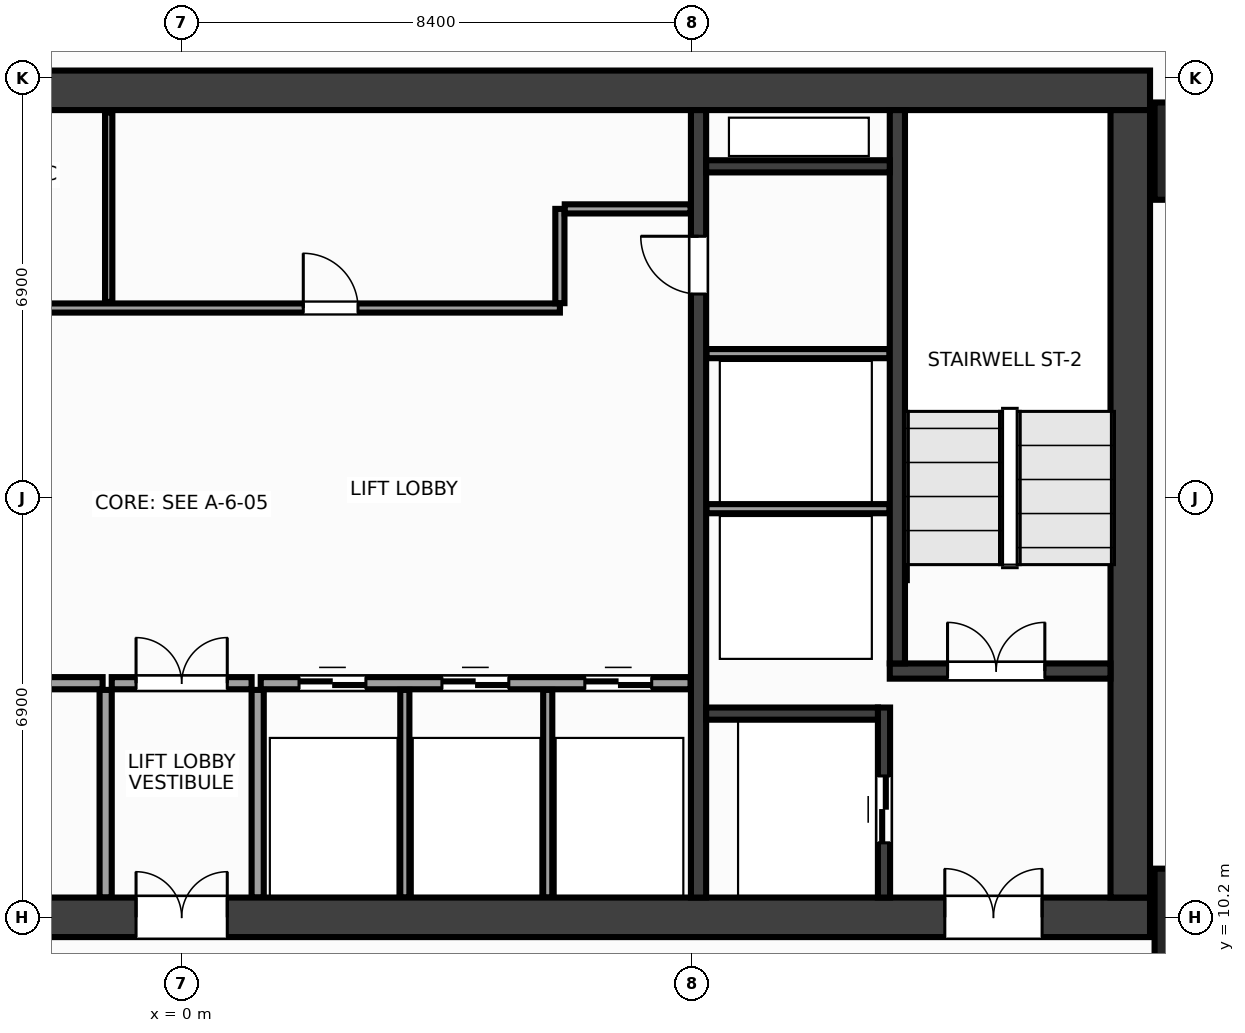
"""IFC4 building model, lengths in metres.
Left out: names, types, materials, properties, quantities, classifications, styles, units other than length and angle.
Written with IfcOpenShell. Run it as: python <this file> out.ifc"""

import sys

from ifc_helpers import new_model, si_unit, direction, frame, frame_2d, origin, origin_2d, place, context, subcontext, project, spatial, rectangle, extrude, source, transform, mapped, element, fill, save


model = new_model("IFC4")
c1 = context("Model", 3, precision=1e-05, world=origin(), true_north=direction((0.0, 1.0)))
c2 = subcontext(c1, "Body", "Model", "MODEL_VIEW")
j1 = project(units=[si_unit("LENGTHUNIT", "METRE"), si_unit("PLANEANGLEUNIT", "RADIAN")], contexts=[c1])
p1 = place(None, origin())
s1 = spatial("IfcSite", under=j1, at=p1, CompositionType="ELEMENT")
p2 = place(p1, origin())
s2 = spatial("IfcBuilding", under=s1, at=p2, CompositionType="ELEMENT")
p3 = place(p2, frame((0.0, 0.0, 146.0)))
s3 = spatial("IfcBuildingStorey", under=s2, at=p3, CompositionType="ELEMENT", Elevation=146.0)
m1 = source(origin(), c2, "Body", "SweptSolid", [
    extrude(rectangle(XDim=31.85, YDim=0.65, at=frame_2d((15.925, 0.0))), origin(), (0.0, 0.0, 1.0), 3.6),
])
p4 = place(p3, frame((-15.925, 23.8, 0.0), z_axis=(0.0, 0.0, 1.0), x_axis=(1.0, 0.0, 0.0)))
e1 = element("IfcWall", 1, at=p4, inside=s3, PredefinedType="SHEAR", context=c2, shape_type="MappedRepresentation", body=[
    mapped(m1, transform((0.0, 0.0, 0.0), x_axis=(1.0, 0.0, 0.0), y_axis=(0.0, 1.0, 0.0), z_axis=(0.0, 0.0, 1.0), scale=1.0)),
])
p5 = place(p3, frame((-15.925, 10.2, 0.0), z_axis=(0.0, 0.0, 1.0), x_axis=(1.0, 0.0, 0.0)))
e2 = element("IfcWall", 2, at=p5, inside=s3, PredefinedType="SHEAR", context=c2, shape_type="MappedRepresentation", body=[
    mapped(m1, transform((0.0, 0.0, 0.0), x_axis=(1.0, 0.0, 0.0), y_axis=(0.0, 1.0, 0.0), z_axis=(0.0, 0.0, 1.0), scale=1.0)),
])
p6 = place(p5, frame((1.775, 0.0, 0.0)))
e3 = element("IfcOpeningElement", 3, at=p6, cuts=e2, PredefinedType="OPENING", context=c2, shape_type="SweptSolid", body=[
    extrude(rectangle(XDim=1.6, YDim=2.15, at=frame_2d((0.8, 1.075))), frame((0.0, 0.337, 0.0), z_axis=(0.0, -1.0, 0.0), x_axis=(1.0, 0.0, 0.0)), (0.0, 0.0, 1.0), 0.674),
])
p7 = place(p5, frame((28.475, 0.0, 0.0)))
e4 = element("IfcOpeningElement", 4, at=p7, cuts=e2, PredefinedType="OPENING", context=c2, shape_type="SweptSolid", body=[
    extrude(rectangle(XDim=1.6, YDim=2.15, at=frame_2d((0.8, 1.075))), frame((0.0, 0.337, 0.0), z_axis=(0.0, -1.0, 0.0), x_axis=(1.0, 0.0, 0.0)), (0.0, 0.0, 1.0), 0.674),
])
p8 = place(p5, frame((15.175, 0.0, 0.0)))
e5 = element("IfcOpeningElement", 5, at=p8, cuts=e2, PredefinedType="OPENING", context=c2, shape_type="SweptSolid", body=[
    extrude(rectangle(XDim=1.5, YDim=2.2, at=frame_2d((0.75, 1.1))), frame((0.0, 0.337, 0.0), z_axis=(0.0, -1.0, 0.0), x_axis=(1.0, 0.0, 0.0)), (0.0, 0.0, 1.0), 0.674),
])
m2 = source(origin(), c2, "Body", "SweptSolid", [
    extrude(rectangle(XDim=12.95, YDim=0.65, at=frame_2d((6.475, 0.0))), origin(), (0.0, 0.0, 1.0), 3.6),
])
p9 = place(p3, frame((15.6, 10.525, 0.0), z_axis=(0.0, 0.0, 1.0), x_axis=(0.0, 1.0, 0.0)))
e6 = element("IfcWall", 6, at=p9, inside=s3, PredefinedType="SHEAR", context=c2, shape_type="MappedRepresentation", body=[
    mapped(m2, transform((0.0, 0.0, 0.0), x_axis=(1.0, 0.0, 0.0), y_axis=(0.0, 1.0, 0.0), z_axis=(0.0, 0.0, 1.0), scale=1.0)),
])
m3 = source(origin(), c2, "Body", "SweptSolid", [
    extrude(rectangle(XDim=12.95, YDim=0.25, at=frame_2d((6.475, 0.0))), origin(), (0.0, 0.0, 1.0), 3.6),
])
p10 = place(p3, frame((8.5, 10.525, 0.0), z_axis=(0.0, 0.0, 1.0), x_axis=(0.0, 1.0, 0.0)))
e7 = element("IfcWall", 7, at=p10, inside=s3, PredefinedType="SHEAR", context=c2, shape_type="MappedRepresentation", body=[
    mapped(m3, transform((0.0, 0.0, 0.0), x_axis=(1.0, 0.0, 0.0), y_axis=(0.0, 1.0, 0.0), z_axis=(0.0, 0.0, 1.0), scale=1.0)),
])
p11 = place(p10, frame((9.925, 0.0, 0.0)))
e8 = element("IfcOpeningElement", 8, at=p11, cuts=e7, PredefinedType="OPENING", context=c2, shape_type="SweptSolid", body=[
    extrude(rectangle(XDim=0.95, YDim=2.15, at=frame_2d((0.475, 1.075))), frame((0.0, 0.137, 0.0), z_axis=(0.0, -1.0, 0.0), x_axis=(1.0, 0.0, 0.0)), (0.0, 0.0, 1.0), 0.274),
])
m4 = source(origin(), c2, "Body", "SweptSolid", [
    extrude(rectangle(XDim=3.63, YDim=0.25, at=frame_2d((1.815, 0.0))), origin(), (0.0, 0.0, 1.0), 3.6),
])
p12 = place(p3, frame((11.645, 14.25, 0.0), z_axis=(0.0, 0.0, 1.0), x_axis=(1.0, 0.0, 0.0)))
e9 = element("IfcWall", 9, at=p12, inside=s3, PredefinedType="SHEAR", context=c2, shape_type="MappedRepresentation", body=[
    mapped(m4, transform((0.0, 0.0, 0.0), x_axis=(1.0, 0.0, 0.0), y_axis=(0.0, 1.0, 0.0), z_axis=(0.0, 0.0, 1.0), scale=1.0)),
])
p13 = place(p12, frame((0.95, 0.0, 0.0)))
e10 = element("IfcOpeningElement", 10, at=p13, cuts=e9, PredefinedType="OPENING", context=c2, shape_type="SweptSolid", body=[
    extrude(rectangle(XDim=1.6, YDim=2.15, at=frame_2d((0.8, 1.075))), frame((0.0, 0.137, 0.0), z_axis=(0.0, -1.0, 0.0), x_axis=(1.0, 0.0, 0.0)), (0.0, 0.0, 1.0), 0.274),
])
m5 = source(origin(), c2, "Body", "SweptSolid", [
    extrude(rectangle(XDim=9.1, YDim=0.25, at=frame_2d((4.55, 0.0))), origin(), (0.0, 0.0, 1.0), 3.6),
])
p14 = place(p3, frame((11.77, 14.375, 0.0), z_axis=(0.0, 0.0, 1.0), x_axis=(0.0, 1.0, 0.0)))
e11 = element("IfcWall", 11, at=p14, inside=s3, PredefinedType="SHEAR", context=c2, shape_type="MappedRepresentation", body=[
    mapped(m5, transform((0.0, 0.0, 0.0), x_axis=(1.0, 0.0, 0.0), y_axis=(0.0, 1.0, 0.0), z_axis=(0.0, 0.0, 1.0), scale=1.0)),
])
m6 = source(origin(), c2, "Body", "SweptSolid", [
    extrude(rectangle(XDim=3.125, YDim=0.2, at=frame_2d((1.562, 0.0))), origin(), (0.0, 0.0, 1.0), 3.6),
])
p15 = place(p3, frame((11.55, 10.525, 0.0), z_axis=(0.0, 0.0, 1.0), x_axis=(0.0, 1.0, 0.0)))
e12 = element("IfcWall", 12, at=p15, inside=s3, PredefinedType="SHEAR", context=c2, shape_type="MappedRepresentation", body=[
    mapped(m6, transform((0.0, 0.0, 0.0), x_axis=(1.0, 0.0, 0.0), y_axis=(0.0, 1.0, 0.0), z_axis=(0.0, 0.0, 1.0), scale=1.0)),
])
p16 = place(p15, frame((0.9, 0.0, 0.0)))
e13 = element("IfcOpeningElement", 13, at=p16, cuts=e12, PredefinedType="OPENING", context=c2, shape_type="SweptSolid", body=[
    extrude(rectangle(XDim=1.1, YDim=2.15, at=frame_2d((0.55, 1.075))), frame((0.0, 0.112, 0.0), z_axis=(0.0, -1.0, 0.0), x_axis=(1.0, 0.0, 0.0)), (0.0, 0.0, 1.0), 0.224),
])
m7 = source(origin(), c2, "Body", "SweptSolid", [
    extrude(rectangle(XDim=2.825, YDim=0.2, at=frame_2d((1.413, 0.0))), origin(), (0.0, 0.0, 1.0), 3.6),
])
p17 = place(p3, frame((8.625, 13.55, 0.0), z_axis=(0.0, 0.0, 1.0), x_axis=(1.0, 0.0, 0.0)))
e14 = element("IfcWall", 14, at=p17, inside=s3, PredefinedType="SHEAR", context=c2, shape_type="MappedRepresentation", body=[
    mapped(m7, transform((0.0, 0.0, 0.0), x_axis=(1.0, 0.0, 0.0), y_axis=(0.0, 1.0, 0.0), z_axis=(0.0, 0.0, 1.0), scale=1.0)),
])
m8 = source(origin(), c2, "Body", "SweptSolid", [
    extrude(rectangle(XDim=3.02, YDim=0.2, at=frame_2d((1.51, 0.0))), origin(), (0.0, 0.0, 1.0), 3.6),
])
p18 = place(p3, frame((8.625, 22.55, 0.0), z_axis=(0.0, 0.0, 1.0), x_axis=(1.0, 0.0, 0.0)))
e15 = element("IfcWall", 15, at=p18, inside=s3, PredefinedType="SHEAR", context=c2, shape_type="MappedRepresentation", body=[
    mapped(m8, transform((0.0, 0.0, 0.0), x_axis=(1.0, 0.0, 0.0), y_axis=(0.0, 1.0, 0.0), z_axis=(0.0, 0.0, 1.0), scale=1.0)),
])
m9 = source(origin(), c2, "Body", "SweptSolid", [
    extrude(rectangle(XDim=1.6, YDim=1.6, at=origin_2d()), origin(), (0.0, 0.0, 1.0), 3.6),
])
for number, where, z_axis, x_axis in (
    (16, (16.8, 10.2, 0.0), (0.0, 0.0, 1.0), (1.0, 0.0, 0.0)),
    (17, (16.8, 22.8, 0.0), (0.0, 0.0, 1.0), (1.0, 0.0, 0.0)),
):
    element("IfcColumn", number, at=place(p3, frame(where, z_axis=z_axis, x_axis=x_axis)), inside=s3, PredefinedType="COLUMN", context=c2, shape_type="MappedRepresentation", body=[
        mapped(m9, transform((0.0, 0.0, 0.0), x_axis=(1.0, 0.0, 0.0), y_axis=(0.0, 1.0, 0.0), z_axis=(0.0, 0.0, 1.0), scale=1.0)),
    ])
m10 = source(origin(), c2, "Body", "SweptSolid", [
    extrude(rectangle(XDim=3.01, YDim=0.15, at=frame_2d((1.505, 0.0))), origin(), (0.0, 0.0, 1.0), 3.38),
])
for number, where, z_axis, x_axis in (
    (18, (8.63, 16.92, 0.0), (0.0, 0.0, 1.0), (1.0, 0.0, 0.0)),
    (19, (8.63, 19.47, 0.0), (0.0, 0.0, 1.0), (1.0, 0.0, 0.0)),
):
    element("IfcWall", number, at=place(p3, frame(where, z_axis=z_axis, x_axis=x_axis)), inside=s3, PredefinedType="PARTITIONING", context=c2, shape_type="MappedRepresentation", body=[
        mapped(m10, transform((0.0, 0.0, 0.0), x_axis=(1.0, 0.0, 0.0), y_axis=(0.0, 1.0, 0.0), z_axis=(0.0, 0.0, 1.0), scale=1.0)),
    ])
m11 = source(origin(), c2, "Body", "SweptSolid", [
    extrude(rectangle(XDim=7.07, YDim=0.2, at=frame_2d((3.535, 0.0))), origin(), (0.0, 0.0, 1.0), 3.38),
])
p19 = place(p3, frame((-8.37, 14.05, 0.0), z_axis=(0.0, 0.0, 1.0), x_axis=(1.0, 0.0, 0.0)))
e20 = element("IfcWall", 20, at=p19, inside=s3, PredefinedType="PARTITIONING", context=c2, shape_type="MappedRepresentation", body=[
    mapped(m11, transform((0.0, 0.0, 0.0), x_axis=(1.0, 0.0, 0.0), y_axis=(0.0, 1.0, 0.0), z_axis=(0.0, 0.0, 1.0), scale=1.0)),
])
p20 = place(p19, frame((2.8, 0.0, 0.0)))
e21 = element("IfcOpeningElement", 21, at=p20, cuts=e20, PredefinedType="OPENING", context=c2, shape_type="SweptSolid", body=[
    extrude(rectangle(XDim=0.98, YDim=2.15, at=frame_2d((0.49, 1.075))), frame((0.0, 0.112, 0.0), z_axis=(0.0, -1.0, 0.0), x_axis=(1.0, 0.0, 0.0)), (0.0, 0.0, 1.0), 0.224),
])
p21 = place(p3, frame((1.3, 14.05, 0.0), z_axis=(0.0, 0.0, 1.0), x_axis=(1.0, 0.0, 0.0)))
e22 = element("IfcWall", 22, at=p21, inside=s3, PredefinedType="PARTITIONING", context=c2, shape_type="MappedRepresentation", body=[
    mapped(m11, transform((0.0, 0.0, 0.0), x_axis=(1.0, 0.0, 0.0), y_axis=(0.0, 1.0, 0.0), z_axis=(0.0, 0.0, 1.0), scale=1.0)),
])
p22 = place(p21, frame((0.63, 0.0, 0.0)))
e23 = element("IfcOpeningElement", 23, at=p22, cuts=e22, PredefinedType="OPENING", context=c2, shape_type="SweptSolid", body=[
    extrude(rectangle(XDim=1.1, YDim=2.15, at=frame_2d((0.55, 1.075))), frame((0.0, 0.112, 0.0), z_axis=(0.0, -1.0, 0.0), x_axis=(1.0, 0.0, 0.0)), (0.0, 0.0, 1.0), 0.224),
])
p23 = place(p21, frame((2.98, 0.0, 0.0)))
e24 = element("IfcOpeningElement", 24, at=p23, cuts=e22, PredefinedType="OPENING", context=c2, shape_type="SweptSolid", body=[
    extrude(rectangle(XDim=1.1, YDim=2.15, at=frame_2d((0.55, 1.075))), frame((0.0, 0.112, 0.0), z_axis=(0.0, -1.0, 0.0), x_axis=(1.0, 0.0, 0.0)), (0.0, 0.0, 1.0), 0.224),
])
p24 = place(p21, frame((5.33, 0.0, 0.0)))
e25 = element("IfcOpeningElement", 25, at=p24, cuts=e22, PredefinedType="OPENING", context=c2, shape_type="SweptSolid", body=[
    extrude(rectangle(XDim=1.1, YDim=2.15, at=frame_2d((0.55, 1.075))), frame((0.0, 0.112, 0.0), z_axis=(0.0, -1.0, 0.0), x_axis=(1.0, 0.0, 0.0)), (0.0, 0.0, 1.0), 0.224),
])
m12 = source(origin(), c2, "Body", "SweptSolid", [
    extrude(rectangle(XDim=3.415, YDim=0.2, at=frame_2d((1.708, 0.0))), origin(), (0.0, 0.0, 1.0), 3.38),
])
for number, where, z_axis, x_axis in (
    (26, (-1.25, 10.525, 0.0), (0.0, 0.0, 1.0), (0.0, 1.0, 0.0)),
    (27, (1.25, 10.525, 0.0), (0.0, 0.0, 1.0), (0.0, 1.0, 0.0)),
):
    element("IfcWall", number, at=place(p3, frame(where, z_axis=z_axis, x_axis=x_axis)), inside=s3, PredefinedType="PARTITIONING", context=c2, shape_type="MappedRepresentation", body=[
        mapped(m12, transform((0.0, 0.0, 0.0), x_axis=(1.0, 0.0, 0.0), y_axis=(0.0, 1.0, 0.0), z_axis=(0.0, 0.0, 1.0), scale=1.0)),
    ])
m13 = source(origin(), c2, "Body", "SweptSolid", [
    extrude(rectangle(XDim=2.3, YDim=0.2, at=frame_2d((1.15, 0.0))), origin(), (0.0, 0.0, 1.0), 3.38),
])
p25 = place(p3, frame((-1.15, 14.05, 0.0), z_axis=(0.0, 0.0, 1.0), x_axis=(1.0, 0.0, 0.0)))
e28 = element("IfcWall", 28, at=p25, inside=s3, PredefinedType="PARTITIONING", context=c2, shape_type="MappedRepresentation", body=[
    mapped(m13, transform((0.0, 0.0, 0.0), x_axis=(1.0, 0.0, 0.0), y_axis=(0.0, 1.0, 0.0), z_axis=(0.0, 0.0, 1.0), scale=1.0)),
])
p26 = place(p25, frame((0.4, 0.0, 0.0)))
e29 = element("IfcOpeningElement", 29, at=p26, cuts=e28, PredefinedType="OPENING", context=c2, shape_type="SweptSolid", body=[
    extrude(rectangle(XDim=1.5, YDim=2.2, at=frame_2d((0.75, 1.1))), frame((0.0, 0.112, 0.0), z_axis=(0.0, -1.0, 0.0), x_axis=(1.0, 0.0, 0.0)), (0.0, 0.0, 1.0), 0.224),
])
m14 = source(origin(), c2, "Body", "SweptSolid", [
    extrude(rectangle(XDim=14.59, YDim=0.15, at=frame_2d((7.295, 0.0))), origin(), (0.0, 0.0, 1.0), 3.38),
])
p27 = place(p3, frame((-8.37, 20.22, 0.0), z_axis=(0.0, 0.0, 1.0), x_axis=(1.0, 0.0, 0.0)))
e30 = element("IfcWall", 30, at=p27, inside=s3, PredefinedType="PARTITIONING", context=c2, shape_type="MappedRepresentation", body=[
    mapped(m14, transform((0.0, 0.0, 0.0), x_axis=(1.0, 0.0, 0.0), y_axis=(0.0, 1.0, 0.0), z_axis=(0.0, 0.0, 1.0), scale=1.0)),
])
p28 = place(p27, frame((1.36, 0.0, 0.0)))
e31 = element("IfcOpeningElement", 31, at=p28, cuts=e30, PredefinedType="OPENING", context=c2, shape_type="SweptSolid", body=[
    extrude(rectangle(XDim=0.9, YDim=2.15, at=frame_2d((0.45, 1.075))), frame((0.0, 0.087, 0.0), z_axis=(0.0, -1.0, 0.0), x_axis=(1.0, 0.0, 0.0)), (0.0, 0.0, 1.0), 0.174),
])
p29 = place(p27, frame((4.92, 0.0, 0.0)))
e32 = element("IfcOpeningElement", 32, at=p29, cuts=e30, PredefinedType="OPENING", context=c2, shape_type="SweptSolid", body=[
    extrude(rectangle(XDim=0.9, YDim=2.15, at=frame_2d((0.45, 1.075))), frame((0.0, 0.087, 0.0), z_axis=(0.0, -1.0, 0.0), x_axis=(1.0, 0.0, 0.0)), (0.0, 0.0, 1.0), 0.174),
])
p30 = place(p27, frame((10.37, 0.0, 0.0)))
e33 = element("IfcOpeningElement", 33, at=p30, cuts=e30, PredefinedType="OPENING", context=c2, shape_type="SweptSolid", body=[
    extrude(rectangle(XDim=0.9, YDim=2.15, at=frame_2d((0.45, 1.075))), frame((0.0, 0.087, 0.0), z_axis=(0.0, -1.0, 0.0), x_axis=(1.0, 0.0, 0.0)), (0.0, 0.0, 1.0), 0.174),
])
m15 = source(origin(), c2, "Body", "SweptSolid", [
    extrude(rectangle(XDim=1.55, YDim=0.15, at=frame_2d((0.775, 0.0))), origin(), (0.0, 0.0, 1.0), 3.38),
])
p31 = place(p3, frame((6.22, 20.3, 0.0), z_axis=(0.0, 0.0, 1.0), x_axis=(0.0, 1.0, 0.0)))
e34 = element("IfcWall", 34, at=p31, inside=s3, PredefinedType="PARTITIONING", context=c2, shape_type="MappedRepresentation", body=[
    mapped(m15, transform((0.0, 0.0, 0.0), x_axis=(1.0, 0.0, 0.0), y_axis=(0.0, 1.0, 0.0), z_axis=(0.0, 0.0, 1.0), scale=1.0)),
])
m16 = source(origin(), c2, "Body", "SweptSolid", [
    extrude(rectangle(XDim=2.07, YDim=0.15, at=frame_2d((1.035, 0.0))), origin(), (0.0, 0.0, 1.0), 3.38),
])
p32 = place(p3, frame((6.3, 21.85, 0.0), z_axis=(0.0, 0.0, 1.0), x_axis=(1.0, 0.0, 0.0)))
e35 = element("IfcWall", 35, at=p32, inside=s3, PredefinedType="PARTITIONING", context=c2, shape_type="MappedRepresentation", body=[
    mapped(m16, transform((0.0, 0.0, 0.0), x_axis=(1.0, 0.0, 0.0), y_axis=(0.0, 1.0, 0.0), z_axis=(0.0, 0.0, 1.0), scale=1.0)),
])
m17 = source(origin(), c2, "Body", "SweptSolid", [
    extrude(rectangle(XDim=3.415, YDim=0.15, at=frame_2d((1.708, 0.0))), origin(), (0.0, 0.0, 1.0), 3.38),
])
for number, where, z_axis, x_axis in (
    (36, (3.67, 10.525, 0.0), (0.0, 0.0, 1.0), (0.0, 1.0, 0.0)),
    (37, (6.02, 10.525, 0.0), (0.0, 0.0, 1.0), (0.0, 1.0, 0.0)),
):
    element("IfcWall", number, at=place(p3, frame(where, z_axis=z_axis, x_axis=x_axis)), inside=s3, PredefinedType="PARTITIONING", context=c2, shape_type="MappedRepresentation", body=[
        mapped(m17, transform((0.0, 0.0, 0.0), x_axis=(1.0, 0.0, 0.0), y_axis=(0.0, 1.0, 0.0), z_axis=(0.0, 0.0, 1.0), scale=1.0)),
    ])
m18 = source(origin(), c2, "Body", "SweptSolid", [
    extrude(rectangle(XDim=3.115, YDim=0.12, at=frame_2d((1.558, 0.0))), origin(), (0.0, 0.0, 1.0), 3.38),
])
p33 = place(p3, frame((-1.2, 20.32, 0.0), z_axis=(0.0, 0.0, 1.0), x_axis=(0.0, 1.0, 0.0)))
e38 = element("IfcWall", 38, at=p33, inside=s3, PredefinedType="PARTITIONING", context=c2, shape_type="MappedRepresentation", body=[
    mapped(m18, transform((0.0, 0.0, 0.0), x_axis=(1.0, 0.0, 0.0), y_axis=(0.0, 1.0, 0.0), z_axis=(0.0, 0.0, 1.0), scale=1.0)),
])
m19 = source(origin(), c2, "Body", "SweptSolid", [
    extrude(rectangle(XDim=1.6, YDim=2.15, at=frame_2d((0.8, 1.075))), frame((0.0, 0.025, 0.0), z_axis=(0.0, -1.0, 0.0), x_axis=(1.0, 0.0, 0.0)), (0.0, 0.0, 1.0), 0.05),
])
p34 = place(p13, origin())
e39 = element("IfcDoor", 39, at=p34, inside=s3, OperationType="DOUBLE_DOOR_SINGLE_SWING", PredefinedType="DOOR", context=c2, shape_type="MappedRepresentation", body=[
    mapped(m19, transform((0.0, 0.0, 0.0), x_axis=(1.0, 0.0, 0.0), y_axis=(0.0, 1.0, 0.0), z_axis=(0.0, 0.0, 1.0), scale=1.0)),
])
fill(e10, e39)
p35 = place(p7, origin())
e40 = element("IfcDoor", 40, at=p35, inside=s3, OperationType="DOUBLE_DOOR_SINGLE_SWING", PredefinedType="DOOR", context=c2, shape_type="MappedRepresentation", body=[
    mapped(m19, transform((0.0, 0.0, 0.0), x_axis=(1.0, 0.0, 0.0), y_axis=(0.0, 1.0, 0.0), z_axis=(0.0, 0.0, 1.0), scale=1.0)),
])
fill(e4, e40)
m20 = source(origin(), c2, "Body", "SweptSolid", [
    extrude(rectangle(XDim=1.1, YDim=2.15, at=frame_2d((0.55, 1.075))), frame((0.0, 0.025, 0.0), z_axis=(0.0, -1.0, 0.0), x_axis=(1.0, 0.0, 0.0)), (0.0, 0.0, 1.0), 0.05),
])
p36 = place(p16, origin())
e41 = element("IfcDoor", 41, at=p36, inside=s3, OperationType="DOUBLE_DOOR_SLIDING", PredefinedType="DOOR", context=c2, shape_type="MappedRepresentation", body=[
    mapped(m20, transform((0.0, 0.0, 0.0), x_axis=(1.0, 0.0, 0.0), y_axis=(0.0, 1.0, 0.0), z_axis=(0.0, 0.0, 1.0), scale=1.0)),
])
fill(e13, e41)
m21 = source(origin(), c2, "Body", "SweptSolid", [
    extrude(rectangle(XDim=0.95, YDim=2.15, at=frame_2d((0.475, 1.075))), frame((0.0, 0.025, 0.0), z_axis=(0.0, -1.0, 0.0), x_axis=(1.0, 0.0, 0.0)), (0.0, 0.0, 1.0), 0.05),
])
p37 = place(p11, origin())
e42 = element("IfcDoor", 42, at=p37, inside=s3, OperationType="SINGLE_SWING_RIGHT", PredefinedType="DOOR", context=c2, shape_type="MappedRepresentation", body=[
    mapped(m21, transform((0.0, 0.0, 0.0), x_axis=(1.0, 0.0, 0.0), y_axis=(0.0, 1.0, 0.0), z_axis=(0.0, 0.0, 1.0), scale=1.0)),
])
fill(e8, e42)
p38 = place(p22, origin())
e43 = element("IfcDoor", 43, at=p38, inside=s3, OperationType="DOUBLE_DOOR_SLIDING", PredefinedType="DOOR", context=c2, shape_type="MappedRepresentation", body=[
    mapped(m20, transform((0.0, 0.0, 0.0), x_axis=(1.0, 0.0, 0.0), y_axis=(0.0, 1.0, 0.0), z_axis=(0.0, 0.0, 1.0), scale=1.0)),
])
fill(e23, e43)
p39 = place(p23, origin())
e44 = element("IfcDoor", 44, at=p39, inside=s3, OperationType="DOUBLE_DOOR_SLIDING", PredefinedType="DOOR", context=c2, shape_type="MappedRepresentation", body=[
    mapped(m20, transform((0.0, 0.0, 0.0), x_axis=(1.0, 0.0, 0.0), y_axis=(0.0, 1.0, 0.0), z_axis=(0.0, 0.0, 1.0), scale=1.0)),
])
fill(e24, e44)
p40 = place(p24, origin())
e45 = element("IfcDoor", 45, at=p40, inside=s3, OperationType="DOUBLE_DOOR_SLIDING", PredefinedType="DOOR", context=c2, shape_type="MappedRepresentation", body=[
    mapped(m20, transform((0.0, 0.0, 0.0), x_axis=(1.0, 0.0, 0.0), y_axis=(0.0, 1.0, 0.0), z_axis=(0.0, 0.0, 1.0), scale=1.0)),
])
fill(e25, e45)
m22 = source(origin(), c2, "Body", "SweptSolid", [
    extrude(rectangle(XDim=1.5, YDim=2.2, at=frame_2d((0.75, 1.1))), frame((0.0, 0.025, 0.0), z_axis=(0.0, -1.0, 0.0), x_axis=(1.0, 0.0, 0.0)), (0.0, 0.0, 1.0), 0.05),
])
p41 = place(p26, origin())
e46 = element("IfcDoor", 46, at=p41, inside=s3, OperationType="DOUBLE_DOOR_SINGLE_SWING", PredefinedType="DOOR", context=c2, shape_type="MappedRepresentation", body=[
    mapped(m22, transform((0.0, 0.0, 0.0), x_axis=(1.0, 0.0, 0.0), y_axis=(0.0, 1.0, 0.0), z_axis=(0.0, 0.0, 1.0), scale=1.0)),
])
fill(e29, e46)
p42 = place(p8, origin())
e47 = element("IfcDoor", 47, at=p42, inside=s3, OperationType="DOUBLE_DOOR_SINGLE_SWING", PredefinedType="DOOR", context=c2, shape_type="MappedRepresentation", body=[
    mapped(m22, transform((0.0, 0.0, 0.0), x_axis=(1.0, 0.0, 0.0), y_axis=(0.0, 1.0, 0.0), z_axis=(0.0, 0.0, 1.0), scale=1.0)),
])
fill(e5, e47)
m23 = source(origin(), c2, "Body", "SweptSolid", [
    extrude(rectangle(XDim=0.9, YDim=2.15, at=frame_2d((0.45, 1.075))), frame((0.0, 0.025, 0.0), z_axis=(0.0, -1.0, 0.0), x_axis=(1.0, 0.0, 0.0)), (0.0, 0.0, 1.0), 0.05),
])
p43 = place(p30, origin())
e48 = element("IfcDoor", 48, at=p43, inside=s3, OperationType="SINGLE_SWING_LEFT", PredefinedType="DOOR", context=c2, shape_type="MappedRepresentation", body=[
    mapped(m23, transform((0.0, 0.0, 0.0), x_axis=(1.0, 0.0, 0.0), y_axis=(0.0, 1.0, 0.0), z_axis=(0.0, 0.0, 1.0), scale=1.0)),
])
fill(e33, e48)
save(model, sys.argv[1])
